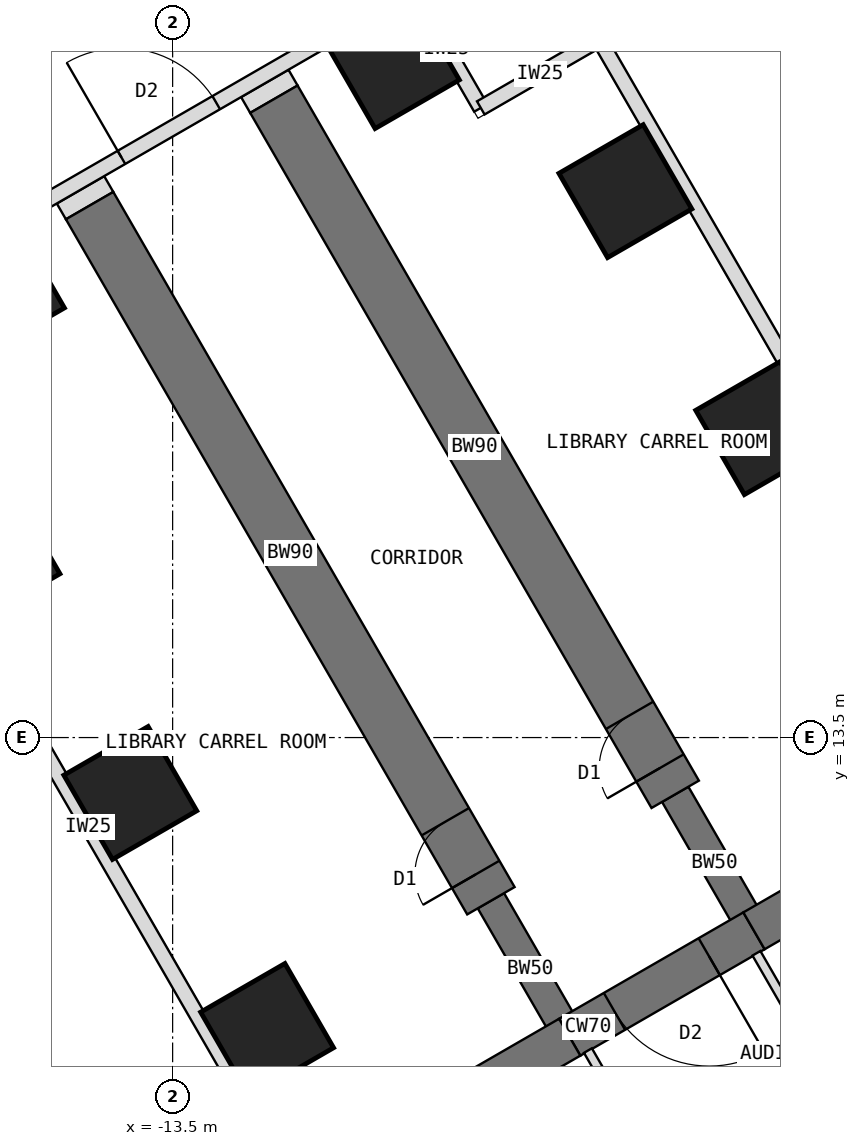
"""IFC4 building model, lengths in metres.
Left out: names, types, materials, properties, quantities, classifications, styles, units other than length and angle.
Written with IfcOpenShell. Run it as: python <this file> out.ifc"""

import sys

from ifc_helpers import new_model, si_unit, direction, frame, frame_2d, origin, origin_2d, place, context, subcontext, project, spatial, rectangle, extrude, element, fill, save


model = new_model("IFC4")
c1 = context("Model", 3, precision=1e-05, world=origin(), true_north=direction((0.0, 1.0)))
c2 = subcontext(c1, "Body", "Model", "MODEL_VIEW")
j1 = project(units=[si_unit("LENGTHUNIT", "METRE"), si_unit("PLANEANGLEUNIT", "RADIAN")], contexts=[c1])
p1 = place(None, origin())
s1 = spatial("IfcSite", under=j1, at=p1, CompositionType="ELEMENT")
p2 = place(p1, origin())
s2 = spatial("IfcBuilding", under=s1, at=p2, CompositionType="ELEMENT")
p3 = place(p2, frame((0.0, 0.0, 10.5)))
s3 = spatial("IfcBuildingStorey", under=s2, at=p3, CompositionType="ELEMENT", Elevation=10.5)
p4 = place(p3, frame((0.0, 12.596, 0.0), z_axis=(0.0, 0.0, 1.0), x_axis=(-0.866011268655, -0.500024481964, 0.0)))
e1 = element("IfcWall", 1, at=p4, inside=s3, PredefinedType="SHEAR", context=c2, shape_type="SweptSolid", body=[
    extrude(rectangle(XDim=4.548, YDim=0.7, at=frame_2d((2.274, 0.0))), origin(), (0.0, 0.0, 1.0), 5.0),
])
p5 = place(p3, frame((-3.939, 10.322, 0.0), z_axis=(0.0, 0.0, 1.0), x_axis=(-0.866019471182, -0.500010275428, 0.0)))
e2 = element("IfcWall", 2, at=p5, inside=s3, PredefinedType="SHEAR", context=c2, shape_type="SweptSolid", body=[
    extrude(rectangle(XDim=3.5, YDim=0.7, at=frame_2d((1.75, 0.0))), origin(), (0.0, 0.0, 1.0), 5.0),
])
p6 = place(p5, frame((0.85, 0.0, 0.0)))
e3 = element("IfcOpeningElement", 3, at=p6, cuts=e2, PredefinedType="OPENING", context=c2, shape_type="SweptSolid", body=[
    extrude(rectangle(XDim=1.8, YDim=2.1, at=frame_2d((0.9, 1.05))), frame((0.0, 0.36, 0.0), z_axis=(0.0, -1.0, 0.0), x_axis=(1.0, 0.0, 0.0)), (0.0, 0.0, 1.0), 0.72),
])
p7 = place(p3, frame((-6.97, 8.572, 0.0), z_axis=(0.0, 0.0, 1.0), x_axis=(-0.866034513004, -0.499984222037, 0.0)))
e4 = element("IfcWall", 4, at=p7, inside=s3, PredefinedType="SHEAR", context=c2, shape_type="SweptSolid", body=[
    extrude(rectangle(XDim=4.548, YDim=0.7, at=frame_2d((2.274, 0.0))), origin(), (0.0, 0.0, 1.0), 5.0),
])
p8 = place(p3, frame((-6.97, 8.572, 0.0), z_axis=(0.0, 0.0, 1.0), x_axis=(-0.499988811324, 0.866031863473, 0.0)))
e5 = element("IfcWall", 5, at=p8, inside=s3, PredefinedType="SHEAR", context=c2, shape_type="SweptSolid", body=[
    extrude(rectangle(XDim=2.592, YDim=0.5, at=frame_2d((1.296, 0.0))), origin(), (0.0, 0.0, 1.0), 5.0),
])
p9 = place(p3, frame((-8.266, 10.816, 0.0), z_axis=(0.0, 0.0, 1.0), x_axis=(-0.499996231654, 0.866027579429, 0.0)))
e6 = element("IfcWall", 6, at=p9, inside=s3, PredefinedType="SHEAR", context=c2, shape_type="SweptSolid", body=[
    extrude(rectangle(XDim=13.2, YDim=0.9, at=frame_2d((6.6, 0.0))), origin(), (0.0, 0.0, 1.0), 5.0),
])
p10 = place(p9, frame((0.5, 0.0, 0.0)))
e7 = element("IfcOpeningElement", 7, at=p10, cuts=e6, PredefinedType="OPENING", context=c2, shape_type="SweptSolid", body=[
    extrude(rectangle(XDim=1.0, YDim=2.1, at=frame_2d((0.5, 1.05))), frame((0.0, 0.46, 0.0), z_axis=(0.0, -1.0, 0.0), x_axis=(1.0, 0.0, 0.0)), (0.0, 0.0, 1.0), 0.92),
])
p11 = place(p3, frame((-3.939, 10.322, 0.0), z_axis=(0.0, 0.0, 1.0), x_axis=(-0.499918158782, 0.866072649678, 0.0)))
e8 = element("IfcWall", 8, at=p11, inside=s3, PredefinedType="SHEAR", context=c2, shape_type="SweptSolid", body=[
    extrude(rectangle(XDim=2.592, YDim=0.5, at=frame_2d((1.296, 0.0))), origin(), (0.0, 0.0, 1.0), 5.0),
])
p12 = place(p3, frame((-5.234, 12.566, 0.0), z_axis=(0.0, 0.0, 1.0), x_axis=(-0.500010103361, 0.866019570528, 0.0)))
e9 = element("IfcWall", 9, at=p12, inside=s3, PredefinedType="SHEAR", context=c2, shape_type="SweptSolid", body=[
    extrude(rectangle(XDim=13.2, YDim=0.9, at=frame_2d((6.6, 0.0))), origin(), (0.0, 0.0, 1.0), 5.0),
])
p13 = place(p12, frame((0.5, 0.0, 0.0)))
e10 = element("IfcOpeningElement", 10, at=p13, cuts=e9, PredefinedType="OPENING", context=c2, shape_type="SweptSolid", body=[
    extrude(rectangle(XDim=1.0, YDim=2.1, at=frame_2d((0.5, 1.05))), frame((0.0, 0.46, 0.0), z_axis=(0.0, -1.0, 0.0), x_axis=(1.0, 0.0, 0.0)), (0.0, 0.0, 1.0), 0.92),
])
for number, where, z_axis, x_axis in (
    (11, (-11.946, 8.691, 0.0), (0.0, 0.0, 1.0), (0.866, 0.5, 0.0)),
    (12, (-14.196, 12.588, 0.0), (0.0, 0.0, 1.0), (0.866, 0.5, 0.0)),
    (13, (-3.804, 18.588, 0.0), (0.0, 0.0, 1.0), (0.866, 0.5, 0.0)),
    (14, (-16.446, 16.486, 0.0), (0.0, 0.0, 1.0), (0.866, 0.5, 0.0)),
    (15, (-6.054, 22.486, 0.0), (0.0, 0.0, 1.0), (0.866, 0.5, 0.0)),
    (16, (-16.373, 20.858, 0.0), (0.0, 0.0, 1.0), (0.866, 0.5, 0.0)),
    (17, (-9.877, 24.608, 0.0), (0.0, 0.0, 1.0), (0.866, 0.5, 0.0)),
):
    element("IfcColumn", number, at=place(p3, frame(where, z_axis=z_axis, x_axis=x_axis)), inside=s3, PredefinedType="COLUMN", context=c2, shape_type="SweptSolid", body=[
        extrude(rectangle(XDim=1.6, YDim=1.6, at=origin_2d()), origin(), (0.0, 0.0, 1.0), 5.0),
    ])
p14 = place(p3, frame((-14.865, 22.248, 0.0), z_axis=(0.0, 0.0, 1.0), x_axis=(-0.500426713919, 0.865778900179, 0.0)))
e18 = element("IfcWall", 18, at=p14, inside=s3, PredefinedType="PARTITIONING", context=c2, shape_type="SweptSolid", body=[
    extrude(rectangle(XDim=0.3, YDim=0.9, at=frame_2d((0.15, 0.0))), origin(), (0.0, 0.0, 1.0), 4.65),
])
p15 = place(p3, frame((-11.834, 23.998, 0.0), z_axis=(0.0, 0.0, 1.0), x_axis=(-0.499816412211, 0.866131372301, 0.0)))
e19 = element("IfcWall", 19, at=p15, inside=s3, PredefinedType="PARTITIONING", context=c2, shape_type="SweptSolid", body=[
    extrude(rectangle(XDim=0.3, YDim=0.9, at=frame_2d((0.15, 0.0))), origin(), (0.0, 0.0, 1.0), 4.65),
])
p16 = place(p3, frame((-4.436, 4.483, 0.0), z_axis=(0.0, 0.0, 1.0), x_axis=(-0.500017246033, 0.866015446554, 0.0)))
e20 = element("IfcWall", 20, at=p16, inside=s3, PredefinedType="PARTITIONING", context=c2, shape_type="SweptSolid", body=[
    extrude(rectangle(XDim=4.469, YDim=0.15, at=frame_2d((2.234, 0.0))), origin(), (0.0, 0.0, 1.0), 4.65),
])
p17 = place(p16, frame((1.744, 0.0, 0.0)))
e21 = element("IfcOpeningElement", 21, at=p17, cuts=e20, PredefinedType="OPENING", context=c2, shape_type="SweptSolid", body=[
    extrude(rectangle(XDim=1.0, YDim=2.1, at=frame_2d((0.5, 1.05))), frame((0.0, 0.085, 0.0), z_axis=(0.0, -1.0, 0.0), x_axis=(1.0, 0.0, 0.0)), (0.0, 0.0, 1.0), 0.17),
])
p18 = place(p3, frame((-3.898, 9.952, 0.0), z_axis=(0.0, 0.0, 1.0), x_axis=(0.499999927604, -0.866025445582, 0.0)))
e22 = element("IfcWall", 22, at=p18, inside=s3, PredefinedType="PARTITIONING", context=c2, shape_type="SweptSolid", body=[
    extrude(rectangle(XDim=4.468, YDim=0.15, at=frame_2d((2.234, 0.0))), origin(), (0.0, 0.0, 1.0), 4.65),
])
p19 = place(p18, frame((1.724, 0.0, 0.0)))
e23 = element("IfcOpeningElement", 23, at=p19, cuts=e22, PredefinedType="OPENING", context=c2, shape_type="SweptSolid", body=[
    extrude(rectangle(XDim=1.0, YDim=2.1, at=frame_2d((0.5, 1.05))), frame((0.0, 0.085, 0.0), z_axis=(0.0, -1.0, 0.0), x_axis=(1.0, 0.0, 0.0)), (0.0, 0.0, 1.0), 0.17),
])
p20 = place(p3, frame((-11.383, 5.967, 0.0), z_axis=(0.0, 0.0, 1.0), x_axis=(-0.499996367808, 0.866027500821, 0.0)))
e24 = element("IfcWall", 24, at=p20, inside=s3, PredefinedType="STANDARD", context=c2, shape_type="SweptSolid", body=[
    extrude(rectangle(XDim=14.016, YDim=0.25, at=frame_2d((7.008, 0.0))), origin(), (0.0, 0.0, 1.0), 4.65),
])
p21 = place(p3, frame((-17.568, 21.178, 0.0), z_axis=(0.0, 0.0, 1.0), x_axis=(0.866025598446, 0.499999662836, 0.0)))
e25 = element("IfcWall", 25, at=p21, inside=s3, PredefinedType="STANDARD", context=c2, shape_type="SweptSolid", body=[
    extrude(rectangle(XDim=9.25, YDim=0.25, at=frame_2d((4.625, 0.0))), origin(), (0.0, 0.0, 1.0), 4.65),
])
p22 = place(p21, frame((3.725, 0.0, 0.0)))
e26 = element("IfcOpeningElement", 26, at=p22, cuts=e25, PredefinedType="OPENING", context=c2, shape_type="SweptSolid", body=[
    extrude(rectangle(XDim=1.8, YDim=2.1, at=frame_2d((0.9, 1.05))), frame((0.0, 0.135, 0.0), z_axis=(0.0, -1.0, 0.0), x_axis=(1.0, 0.0, 0.0)), (0.0, 0.0, 1.0), 0.27),
])
for number, where, z_axis, x_axis in (
    (27, (-9.557, 25.803, 0.0), (0.0, 0.0, 1.0), (0.5, -0.866, 0.0)),
    (28, (-8.432, 23.855, 0.0), (0.0, 0.0, 1.0), (0.866, 0.5, 0.0)),
):
    element("IfcWall", number, at=place(p3, frame(where, z_axis=z_axis, x_axis=x_axis)), inside=s3, PredefinedType="STANDARD", context=c2, shape_type="SweptSolid", body=[
        extrude(rectangle(XDim=2.25, YDim=0.25, at=frame_2d((1.125, 0.0))), origin(), (0.0, 0.0, 1.0), 4.65),
    ])
p23 = place(p3, frame((-6.484, 24.98, 0.0), z_axis=(0.0, 0.0, 1.0), x_axis=(0.499996367808, -0.866027500821, 0.0)))
e29 = element("IfcWall", 29, at=p23, inside=s3, PredefinedType="STANDARD", context=c2, shape_type="SweptSolid", body=[
    extrude(rectangle(XDim=14.016, YDim=0.25, at=frame_2d((7.008, 0.0))), origin(), (0.0, 0.0, 1.0), 4.65),
])
p24 = place(p6, origin())
e30 = element("IfcDoor", 30, at=p24, inside=s3, OperationType="DOUBLE_DOOR_DOUBLE_SWING", PredefinedType="DOOR", context=c2, shape_type="SweptSolid", body=[
    extrude(rectangle(XDim=1.72, YDim=2.06, at=frame_2d((0.9, 1.03))), frame((0.0, 0.025, 0.0), z_axis=(0.0, -1.0, 0.0), x_axis=(1.0, 0.0, 0.0)), (0.0, 0.0, 1.0), 0.05),
    extrude(rectangle(XDim=0.04, YDim=2.1, at=frame_2d((0.02, 1.05))), frame((0.0, 0.35, 0.0), z_axis=(0.0, -1.0, 0.0), x_axis=(1.0, 0.0, 0.0)), (0.0, 0.0, 1.0), 0.699),
    extrude(rectangle(XDim=0.04, YDim=2.1, at=frame_2d((1.78, 1.05))), frame((0.0, 0.35, 0.0), z_axis=(0.0, -1.0, 0.0), x_axis=(1.0, 0.0, 0.0)), (0.0, 0.0, 1.0), 0.699),
    extrude(rectangle(XDim=1.72, YDim=0.04, at=frame_2d((0.9, 2.08))), frame((0.0, 0.35, 0.0), z_axis=(0.0, -1.0, 0.0), x_axis=(1.0, 0.0, 0.0)), (0.0, 0.0, 1.0), 0.699),
])
fill(e3, e30)
p25 = place(p10, origin())
e31 = element("IfcDoor", 31, at=p25, inside=s3, OperationType="SINGLE_SWING_LEFT", PredefinedType="DOOR", context=c2, shape_type="SweptSolid", body=[
    extrude(rectangle(XDim=0.92, YDim=2.06, at=frame_2d((0.5, 1.03))), frame((0.0, 0.025, 0.0), z_axis=(0.0, -1.0, 0.0), x_axis=(1.0, 0.0, 0.0)), (0.0, 0.0, 1.0), 0.05),
    extrude(rectangle(XDim=0.04, YDim=2.1, at=frame_2d((0.02, 1.05))), frame((0.0, 0.45, 0.0), z_axis=(0.0, -1.0, 0.0), x_axis=(1.0, 0.0, 0.0)), (0.0, 0.0, 1.0), 0.899),
    extrude(rectangle(XDim=0.04, YDim=2.1, at=frame_2d((0.98, 1.05))), frame((0.0, 0.45, 0.0), z_axis=(0.0, -1.0, 0.0), x_axis=(1.0, 0.0, 0.0)), (0.0, 0.0, 1.0), 0.899),
    extrude(rectangle(XDim=0.92, YDim=0.04, at=frame_2d((0.5, 2.08))), frame((0.0, 0.45, 0.0), z_axis=(0.0, -1.0, 0.0), x_axis=(1.0, 0.0, 0.0)), (0.0, 0.0, 1.0), 0.899),
])
fill(e7, e31)
p26 = place(p13, origin())
e32 = element("IfcDoor", 32, at=p26, inside=s3, OperationType="SINGLE_SWING_LEFT", PredefinedType="DOOR", context=c2, shape_type="SweptSolid", body=[
    extrude(rectangle(XDim=0.92, YDim=2.06, at=frame_2d((0.5, 1.03))), frame((0.0, 0.025, 0.0), z_axis=(0.0, -1.0, 0.0), x_axis=(1.0, 0.0, 0.0)), (0.0, 0.0, 1.0), 0.05),
    extrude(rectangle(XDim=0.04, YDim=2.1, at=frame_2d((0.02, 1.05))), frame((0.0, 0.45, 0.0), z_axis=(0.0, -1.0, 0.0), x_axis=(1.0, 0.0, 0.0)), (0.0, 0.0, 1.0), 0.899),
    extrude(rectangle(XDim=0.04, YDim=2.1, at=frame_2d((0.98, 1.05))), frame((0.0, 0.45, 0.0), z_axis=(0.0, -1.0, 0.0), x_axis=(1.0, 0.0, 0.0)), (0.0, 0.0, 1.0), 0.899),
    extrude(rectangle(XDim=0.92, YDim=0.04, at=frame_2d((0.5, 2.08))), frame((0.0, 0.45, 0.0), z_axis=(0.0, -1.0, 0.0), x_axis=(1.0, 0.0, 0.0)), (0.0, 0.0, 1.0), 0.899),
])
fill(e10, e32)
p27 = place(p22, origin())
e33 = element("IfcDoor", 33, at=p27, inside=s3, OperationType="DOUBLE_DOOR_DOUBLE_SWING", PredefinedType="DOOR", context=c2, shape_type="SweptSolid", body=[
    extrude(rectangle(XDim=1.8, YDim=2.1, at=frame_2d((0.9, 1.05))), frame((0.0, 0.025, 0.0), z_axis=(0.0, -1.0, 0.0), x_axis=(1.0, 0.0, 0.0)), (0.0, 0.0, 1.0), 0.05),
])
fill(e26, e33)
save(model, sys.argv[1])
